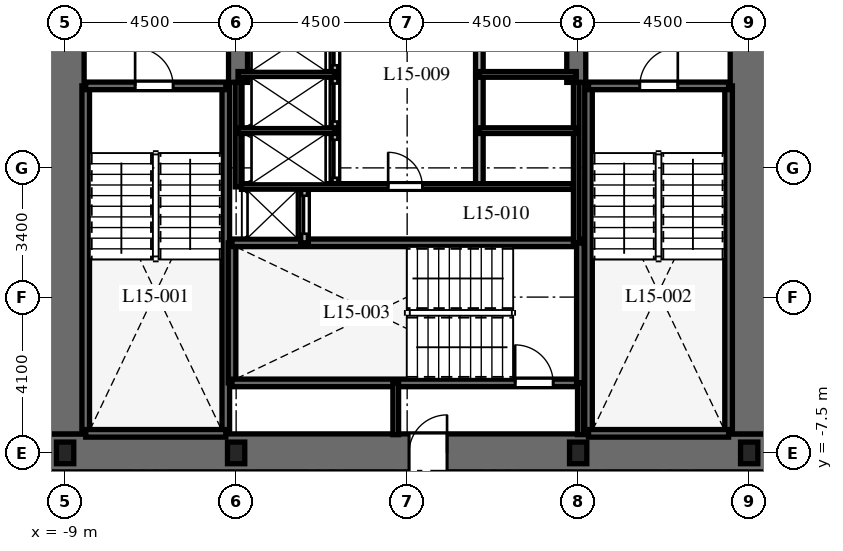
"""IFC4 building model, lengths in metres.
Left out: names, types, materials, properties, quantities, classifications, styles, units other than length and angle.
Written with IfcOpenShell. Run it as: python <this file> out.ifc"""

import sys

from ifc_helpers import new_model, si_unit, direction, frame, frame_2d, origin, origin_2d, place, context, subcontext, project, spatial, rectangle, i_section, extrude, element, fill, save


model = new_model("IFC4")
c1 = context("Model", 3, precision=1e-05, world=origin(), true_north=direction((0.0, 1.0)))
c2 = subcontext(c1, "Body", "Model", "MODEL_VIEW")
j1 = project(units=[si_unit("LENGTHUNIT", "METRE"), si_unit("PLANEANGLEUNIT", "RADIAN")], contexts=[c1])
p1 = place(None, origin())
s1 = spatial("IfcSite", under=j1, at=p1, CompositionType="ELEMENT")
p2 = place(p1, origin())
s2 = spatial("IfcBuilding", under=s1, at=p2, CompositionType="ELEMENT")
p3 = place(p2, frame((0.0, 0.0, 67.5)))
s3 = spatial("IfcBuildingStorey", under=s2, at=p3, CompositionType="ELEMENT", Elevation=67.5)
p4 = place(p3, frame((-9.5, -7.5, 0.0), z_axis=(0.0, 0.0, 1.0), x_axis=(1.0, 0.0, 0.0)))
e1 = element("IfcWall", 1, at=p4, inside=s3, PredefinedType="SHEAR", context=c2, shape_type="SweptSolid", body=[
    extrude(rectangle(XDim=19.0, YDim=1.0, at=frame_2d((9.5, 0.0))), origin(), (0.0, 0.0, 1.0), 3.7),
])
p5 = place(p4, frame((9.55, 0.0, 0.0)))
e2 = element("IfcOpeningElement", 2, at=p5, cuts=e1, PredefinedType="OPENING", context=c2, shape_type="SweptSolid", body=[
    extrude(rectangle(XDim=1.0, YDim=2.15, at=frame_2d((0.5, 1.075))), frame((0.0, 0.51, 0.0), z_axis=(0.0, -1.0, 0.0), x_axis=(1.0, 0.0, 0.0)), (0.0, 0.0, 1.0), 1.02),
])
p6 = place(p3, frame((-9.0, -7.0, 0.0), z_axis=(0.0, 0.0, 1.0), x_axis=(0.0, 1.0, 0.0)))
e3 = element("IfcWall", 3, at=p6, inside=s3, PredefinedType="SHEAR", context=c2, shape_type="SweptSolid", body=[
    extrude(rectangle(XDim=14.0, YDim=1.0, at=frame_2d((7.0, 0.0))), origin(), (0.0, 0.0, 1.0), 3.7),
])
p7 = place(p6, frame((10.125, 0.0, 0.0)))
e4 = element("IfcOpeningElement", 4, at=p7, cuts=e3, PredefinedType="OPENING", context=c2, shape_type="SweptSolid", body=[
    extrude(rectangle(XDim=1.05, YDim=2.15, at=frame_2d((0.525, 1.075))), frame((0.0, 0.51, 0.0), z_axis=(0.0, -1.0, 0.0), x_axis=(1.0, 0.0, 0.0)), (0.0, 0.0, 1.0), 1.02),
])
p8 = place(p3, frame((9.0, -7.0, 0.0), z_axis=(0.0, 0.0, 1.0), x_axis=(0.0, 1.0, 0.0)))
e5 = element("IfcWall", 5, at=p8, inside=s3, PredefinedType="SHEAR", context=c2, shape_type="SweptSolid", body=[
    extrude(rectangle(XDim=14.0, YDim=1.0, at=frame_2d((7.0, 0.0))), origin(), (0.0, 0.0, 1.0), 3.7),
])
p9 = place(p8, frame((10.125, 0.0, 0.0)))
e6 = element("IfcOpeningElement", 6, at=p9, cuts=e5, PredefinedType="OPENING", context=c2, shape_type="SweptSolid", body=[
    extrude(rectangle(XDim=1.05, YDim=2.15, at=frame_2d((0.525, 1.075))), frame((0.0, 0.51, 0.0), z_axis=(0.0, -1.0, 0.0), x_axis=(1.0, 0.0, 0.0)), (0.0, 0.0, 1.0), 1.02),
])
for number, where, z_axis, x_axis in (
    (7, (-4.45, 2.25, 0.0), (0.0, 0.0, 1.0), (0.0, 1.0, 0.0)),
    (8, (4.45, 2.25, 0.0), (0.0, 0.0, 1.0), (0.0, 1.0, 0.0)),
):
    element("IfcWall", number, at=place(p3, frame(where, z_axis=z_axis, x_axis=x_axis)), inside=s3, PredefinedType="SHEAR", context=c2, shape_type="SweptSolid", body=[
        extrude(rectangle(XDim=4.75, YDim=0.5, at=frame_2d((2.375, 0.0))), origin(), (0.0, 0.0, 1.0), 3.7),
    ])
for number, where, z_axis, x_axis in (
    (9, (-8.458, -6.985, 0.0), (0.0, 0.0, 1.0), (0.0, 1.0, 0.0)),
    (10, (-4.772, -6.985, 0.0), (0.0, 0.0, 1.0), (0.0, 1.0, 0.0)),
):
    element("IfcWall", number, at=place(p3, frame(where, z_axis=z_axis, x_axis=x_axis)), inside=s3, PredefinedType="SHEAR", context=c2, shape_type="SweptSolid", body=[
        extrude(rectangle(XDim=9.143, YDim=0.2, at=frame_2d((4.572, 0.0))), origin(), (0.0, 0.0, 1.0), 3.7),
    ])
p10 = place(p3, frame((-8.458, -6.985, 0.0), z_axis=(0.0, 0.0, 1.0), x_axis=(1.0, 0.0, 0.0)))
e11 = element("IfcWall", 11, at=p10, inside=s3, PredefinedType="SHEAR", context=c2, shape_type="SweptSolid", body=[
    extrude(rectangle(XDim=3.686, YDim=0.2, at=frame_2d((1.843, 0.0))), origin(), (0.0, 0.0, 1.0), 3.7),
])
p11 = place(p3, frame((-8.458, 2.158, 0.0), z_axis=(0.0, 0.0, 1.0), x_axis=(1.0, 0.0, 0.0)))
e12 = element("IfcWall", 12, at=p11, inside=s3, PredefinedType="SHEAR", context=c2, shape_type="SweptSolid", body=[
    extrude(rectangle(XDim=3.686, YDim=0.2, at=frame_2d((1.843, 0.0))), origin(), (0.0, 0.0, 1.0), 3.7),
])
p12 = place(p11, frame((1.3, 0.0, 0.0)))
e13 = element("IfcOpeningElement", 13, at=p12, cuts=e12, PredefinedType="OPENING", context=c2, shape_type="SweptSolid", body=[
    extrude(rectangle(XDim=1.0, YDim=2.15, at=frame_2d((0.5, 1.075))), frame((0.0, 0.11, 0.0), z_axis=(0.0, -1.0, 0.0), x_axis=(1.0, 0.0, 0.0)), (0.0, 0.0, 1.0), 0.22),
])
for number, where, z_axis, x_axis in (
    (14, (4.772, -6.985, 0.0), (0.0, 0.0, 1.0), (0.0, 1.0, 0.0)),
    (15, (8.458, -6.985, 0.0), (0.0, 0.0, 1.0), (0.0, 1.0, 0.0)),
):
    element("IfcWall", number, at=place(p3, frame(where, z_axis=z_axis, x_axis=x_axis)), inside=s3, PredefinedType="SHEAR", context=c2, shape_type="SweptSolid", body=[
        extrude(rectangle(XDim=9.143, YDim=0.2, at=frame_2d((4.572, 0.0))), origin(), (0.0, 0.0, 1.0), 3.7),
    ])
p13 = place(p3, frame((4.772, -6.985, 0.0), z_axis=(0.0, 0.0, 1.0), x_axis=(1.0, 0.0, 0.0)))
e16 = element("IfcWall", 16, at=p13, inside=s3, PredefinedType="SHEAR", context=c2, shape_type="SweptSolid", body=[
    extrude(rectangle(XDim=3.686, YDim=0.2, at=frame_2d((1.843, 0.0))), origin(), (0.0, 0.0, 1.0), 3.7),
])
p14 = place(p3, frame((4.772, 2.158, 0.0), z_axis=(0.0, 0.0, 1.0), x_axis=(1.0, 0.0, 0.0)))
e17 = element("IfcWall", 17, at=p14, inside=s3, PredefinedType="SHEAR", context=c2, shape_type="SweptSolid", body=[
    extrude(rectangle(XDim=3.686, YDim=0.2, at=frame_2d((1.843, 0.0))), origin(), (0.0, 0.0, 1.0), 3.7),
])
p15 = place(p14, frame((1.35, 0.0, 0.0)))
e18 = element("IfcOpeningElement", 18, at=p15, cuts=e17, PredefinedType="OPENING", context=c2, shape_type="SweptSolid", body=[
    extrude(rectangle(XDim=1.0, YDim=2.15, at=frame_2d((0.5, 1.075))), frame((0.0, 0.11, 0.0), z_axis=(0.0, -1.0, 0.0), x_axis=(1.0, 0.0, 0.0)), (0.0, 0.0, 1.0), 0.22),
])
p16 = place(p3, frame((-4.608, -5.658, 0.0), z_axis=(0.0, 0.0, 1.0), x_axis=(0.0, 1.0, 0.0)))
e19 = element("IfcWall", 19, at=p16, inside=s3, PredefinedType="SHEAR", context=c2, shape_type="SweptSolid", body=[
    extrude(rectangle(XDim=3.686, YDim=0.2, at=frame_2d((1.843, 0.0))), origin(), (0.0, 0.0, 1.0), 3.7),
])
p17 = place(p3, frame((-4.608, -5.658, 0.0), z_axis=(0.0, 0.0, 1.0), x_axis=(1.0, 0.0, 0.0)))
e20 = element("IfcWall", 20, at=p17, inside=s3, PredefinedType="SHEAR", context=c2, shape_type="SweptSolid", body=[
    extrude(rectangle(XDim=9.166, YDim=0.2, at=frame_2d((4.583, 0.0))), origin(), (0.0, 0.0, 1.0), 3.7),
])
p18 = place(p17, frame((7.45, 0.0, 0.0)))
e21 = element("IfcOpeningElement", 21, at=p18, cuts=e20, PredefinedType="OPENING", context=c2, shape_type="SweptSolid", body=[
    extrude(rectangle(XDim=1.0, YDim=2.15, at=frame_2d((0.5, 1.075))), frame((0.0, 0.11, 0.0), z_axis=(0.0, -1.0, 0.0), x_axis=(1.0, 0.0, 0.0)), (0.0, 0.0, 1.0), 0.22),
])
p19 = place(p3, frame((-4.608, -1.972, 0.0), z_axis=(0.0, 0.0, 1.0), x_axis=(1.0, 0.0, 0.0)))
e22 = element("IfcWall", 22, at=p19, inside=s3, PredefinedType="SHEAR", context=c2, shape_type="SweptSolid", body=[
    extrude(rectangle(XDim=9.166, YDim=0.2, at=frame_2d((4.583, 0.0))), origin(), (0.0, 0.0, 1.0), 3.7),
])
p20 = place(p3, frame((4.558, -5.658, 0.0), z_axis=(0.0, 0.0, 1.0), x_axis=(0.0, 1.0, 0.0)))
e23 = element("IfcWall", 23, at=p20, inside=s3, PredefinedType="SHEAR", context=c2, shape_type="SweptSolid", body=[
    extrude(rectangle(XDim=3.686, YDim=0.2, at=frame_2d((1.843, 0.0))), origin(), (0.0, 0.0, 1.0), 3.7),
])
for number, where, z_axis, x_axis in (
    (24, (-9.0, -7.5, 0.0), (0.0, 0.0, 1.0), (1.0, 0.0, 0.0)),
    (25, (-4.5, -7.5, 0.0), (0.0, 0.0, 1.0), (1.0, 0.0, 0.0)),
    (26, (4.5, -7.5, 0.0), (0.0, 0.0, 1.0), (1.0, 0.0, 0.0)),
    (27, (9.0, -7.5, 0.0), (0.0, 0.0, 1.0), (1.0, 0.0, 0.0)),
):
    element("IfcColumn", number, at=place(p3, frame(where, z_axis=z_axis, x_axis=x_axis)), inside=s3, PredefinedType="COLUMN", context=c2, shape_type="SweptSolid", body=[
        extrude(i_section(OverallWidth=0.454, OverallDepth=0.569, WebThickness=0.078, FlangeThickness=0.125, at=origin_2d()), origin(), (0.0, 0.0, 1.0), 3.7),
    ])
for number, where, z_axis, x_axis in (
    (28, (-0.3, -7.02, 0.0), (0.0, 0.0, 1.0), (0.0, 1.0, 0.0)),
    (29, (4.558, -7.02, 0.0), (0.0, 0.0, 1.0), (0.0, 1.0, 0.0)),
):
    element("IfcWall", number, at=place(p3, frame(where, z_axis=z_axis, x_axis=x_axis)), inside=s3, PredefinedType="PARTITIONING", context=c2, shape_type="SweptSolid", body=[
        extrude(rectangle(XDim=1.362, YDim=0.15, at=frame_2d((0.681, 0.0))), origin(), (0.0, 0.0, 1.0), 3.4),
    ])
p21 = place(p3, frame((-2.7, -1.972, 0.0), z_axis=(0.0, 0.0, 1.0), x_axis=(0.0, 1.0, 0.0)))
e30 = element("IfcWall", 30, at=p21, inside=s3, PredefinedType="PARTITIONING", context=c2, shape_type="SweptSolid", body=[
    extrude(rectangle(XDim=1.472, YDim=0.2, at=frame_2d((0.736, 0.0))), origin(), (0.0, 0.0, 1.0), 3.4),
])
p22 = place(p21, frame((0.24, 0.0, 0.0)))
e31 = element("IfcOpeningElement", 31, at=p22, cuts=e30, PredefinedType="OPENING", context=c2, shape_type="SweptSolid", body=[
    extrude(rectangle(XDim=1.0, YDim=2.2, at=frame_2d((0.5, 1.1))), frame((0.0, 0.11, 0.0), z_axis=(0.0, -1.0, 0.0), x_axis=(1.0, 0.0, 0.0)), (0.0, 0.0, 1.0), 0.22),
])
p23 = place(p3, frame((-4.45, -0.5, 0.0), z_axis=(0.0, 0.0, 1.0), x_axis=(0.0, 1.0, 0.0)))
e32 = element("IfcWall", 32, at=p23, inside=s3, PredefinedType="PARTITIONING", context=c2, shape_type="SweptSolid", body=[
    extrude(rectangle(XDim=2.75, YDim=0.15, at=frame_2d((1.375, 0.0))), origin(), (0.0, 0.0, 1.0), 3.4),
])
p24 = place(p3, frame((4.45, -1.972, 0.0), z_axis=(0.0, 0.0, 1.0), x_axis=(0.0, 1.0, 0.0)))
e33 = element("IfcWall", 33, at=p24, inside=s3, PredefinedType="PARTITIONING", context=c2, shape_type="SweptSolid", body=[
    extrude(rectangle(XDim=4.222, YDim=0.15, at=frame_2d((2.111, 0.0))), origin(), (0.0, 0.0, 1.0), 3.4),
])
p25 = place(p3, frame((-1.9, -0.5, 0.0), z_axis=(0.0, 0.0, 1.0), x_axis=(0.0, 1.0, 0.0)))
e34 = element("IfcWall", 34, at=p25, inside=s3, PredefinedType="PARTITIONING", context=c2, shape_type="SweptSolid", body=[
    extrude(rectangle(XDim=4.44, YDim=0.2, at=frame_2d((2.22, 0.0))), origin(), (0.0, 0.0, 1.0), 3.4),
])
p26 = place(p25, frame((0.24, 0.0, 0.0)))
e35 = element("IfcOpeningElement", 35, at=p26, cuts=e34, PredefinedType="OPENING", context=c2, shape_type="SweptSolid", body=[
    extrude(rectangle(XDim=1.0, YDim=2.2, at=frame_2d((0.5, 1.1))), frame((0.0, 0.11, 0.0), z_axis=(0.0, -1.0, 0.0), x_axis=(1.0, 0.0, 0.0)), (0.0, 0.0, 1.0), 0.22),
])
p27 = place(p25, frame((1.72, 0.0, 0.0)))
e36 = element("IfcOpeningElement", 36, at=p27, cuts=e34, PredefinedType="OPENING", context=c2, shape_type="SweptSolid", body=[
    extrude(rectangle(XDim=1.0, YDim=2.2, at=frame_2d((0.5, 1.1))), frame((0.0, 0.11, 0.0), z_axis=(0.0, -1.0, 0.0), x_axis=(1.0, 0.0, 0.0)), (0.0, 0.0, 1.0), 0.22),
])
p28 = place(p25, frame((3.2, 0.0, 0.0)))
e37 = element("IfcOpeningElement", 37, at=p28, cuts=e34, PredefinedType="OPENING", context=c2, shape_type="SweptSolid", body=[
    extrude(rectangle(XDim=1.0, YDim=2.2, at=frame_2d((0.5, 1.1))), frame((0.0, 0.11, 0.0), z_axis=(0.0, -1.0, 0.0), x_axis=(1.0, 0.0, 0.0)), (0.0, 0.0, 1.0), 0.22),
])
for number, where, z_axis, x_axis in (
    (38, (-4.45, 0.98, 0.0), (0.0, 0.0, 1.0), (1.0, 0.0, 0.0)),
    (39, (-4.45, 2.46, 0.0), (0.0, 0.0, 1.0), (1.0, 0.0, 0.0)),
):
    element("IfcWall", number, at=place(p3, frame(where, z_axis=z_axis, x_axis=x_axis)), inside=s3, PredefinedType="PARTITIONING", context=c2, shape_type="SweptSolid", body=[
        extrude(rectangle(XDim=2.55, YDim=0.15, at=frame_2d((1.275, 0.0))), origin(), (0.0, 0.0, 1.0), 3.4),
    ])
p29 = place(p3, frame((1.9, -0.5, 0.0), z_axis=(0.0, 0.0, 1.0), x_axis=(0.0, 1.0, 0.0)))
e40 = element("IfcWall", 40, at=p29, inside=s3, PredefinedType="PARTITIONING", context=c2, shape_type="SweptSolid", body=[
    extrude(rectangle(XDim=4.44, YDim=0.2, at=frame_2d((2.22, 0.0))), origin(), (0.0, 0.0, 1.0), 3.4),
])
for number, where, z_axis, x_axis in (
    (41, (1.9, 0.98, 0.0), (0.0, 0.0, 1.0), (1.0, 0.0, 0.0)),
    (42, (1.9, 2.46, 0.0), (0.0, 0.0, 1.0), (1.0, 0.0, 0.0)),
):
    element("IfcWall", number, at=place(p3, frame(where, z_axis=z_axis, x_axis=x_axis)), inside=s3, PredefinedType="PARTITIONING", context=c2, shape_type="SweptSolid", body=[
        extrude(rectangle(XDim=2.55, YDim=0.15, at=frame_2d((1.275, 0.0))), origin(), (0.0, 0.0, 1.0), 3.4),
    ])
p30 = place(p3, frame((-4.36, -0.49, 0.0), z_axis=(0.0, 0.0, 1.0), x_axis=(1.0, 0.0, 0.0)))
e43 = element("IfcWall", 43, at=p30, inside=s3, PredefinedType="PARTITIONING", context=c2, shape_type="SweptSolid", body=[
    extrude(rectangle(XDim=8.72, YDim=0.15, at=frame_2d((4.36, 0.0))), origin(), (0.0, 0.0, 1.0), 3.4),
])
p31 = place(p30, frame((3.86, 0.0, 0.0)))
e44 = element("IfcOpeningElement", 44, at=p31, cuts=e43, PredefinedType="OPENING", context=c2, shape_type="SweptSolid", body=[
    extrude(rectangle(XDim=0.9, YDim=2.03, at=frame_2d((0.45, 1.015))), frame((0.0, 0.085, 0.0), z_axis=(0.0, -1.0, 0.0), x_axis=(1.0, 0.0, 0.0)), (0.0, 0.0, 1.0), 0.17),
])
p32 = place(p12, origin())
e45 = element("IfcDoor", 45, at=p32, inside=s3, OperationType="SINGLE_SWING_LEFT", PredefinedType="DOOR", context=c2, shape_type="SweptSolid", body=[
    extrude(rectangle(XDim=1.0, YDim=2.15, at=frame_2d((0.5, 1.075))), frame((0.0, 0.025, 0.0), z_axis=(0.0, -1.0, 0.0), x_axis=(1.0, 0.0, 0.0)), (0.0, 0.0, 1.0), 0.05),
])
fill(e13, e45)
p33 = place(p15, origin())
e46 = element("IfcDoor", 46, at=p33, inside=s3, OperationType="SINGLE_SWING_RIGHT", PredefinedType="DOOR", context=c2, shape_type="SweptSolid", body=[
    extrude(rectangle(XDim=1.0, YDim=2.15, at=frame_2d((0.5, 1.075))), frame((0.0, 0.025, 0.0), z_axis=(0.0, -1.0, 0.0), x_axis=(1.0, 0.0, 0.0)), (0.0, 0.0, 1.0), 0.05),
])
fill(e18, e46)
p34 = place(p18, origin())
e47 = element("IfcDoor", 47, at=p34, inside=s3, OperationType="SINGLE_SWING_LEFT", PredefinedType="DOOR", context=c2, shape_type="SweptSolid", body=[
    extrude(rectangle(XDim=1.0, YDim=2.15, at=frame_2d((0.5, 1.075))), frame((0.0, 0.025, 0.0), z_axis=(0.0, -1.0, 0.0), x_axis=(1.0, 0.0, 0.0)), (0.0, 0.0, 1.0), 0.05),
])
fill(e21, e47)
p35 = place(p5, origin())
e48 = element("IfcDoor", 48, at=p35, inside=s3, OperationType="SINGLE_SWING_RIGHT", PredefinedType="DOOR", context=c2, shape_type="SweptSolid", body=[
    extrude(rectangle(XDim=1.0, YDim=2.15, at=frame_2d((0.5, 1.075))), frame((0.0, 0.025, 0.0), z_axis=(0.0, -1.0, 0.0), x_axis=(1.0, 0.0, 0.0)), (0.0, 0.0, 1.0), 0.05),
])
fill(e2, e48)
p36 = place(p22, origin())
e49 = element("IfcDoor", 49, at=p36, inside=s3, OperationType="SLIDING_TO_LEFT", PredefinedType="DOOR", context=c2, shape_type="SweptSolid", body=[
    extrude(rectangle(XDim=1.0, YDim=2.2, at=frame_2d((0.5, 1.1))), frame((0.0, 0.025, 0.0), z_axis=(0.0, -1.0, 0.0), x_axis=(1.0, 0.0, 0.0)), (0.0, 0.0, 1.0), 0.05),
])
fill(e31, e49)
p37 = place(p26, origin())
e50 = element("IfcDoor", 50, at=p37, inside=s3, OperationType="SLIDING_TO_LEFT", PredefinedType="DOOR", context=c2, shape_type="SweptSolid", body=[
    extrude(rectangle(XDim=1.0, YDim=2.2, at=frame_2d((0.5, 1.1))), frame((0.0, 0.025, 0.0), z_axis=(0.0, -1.0, 0.0), x_axis=(1.0, 0.0, 0.0)), (0.0, 0.0, 1.0), 0.05),
])
fill(e35, e50)
p38 = place(p27, origin())
e51 = element("IfcDoor", 51, at=p38, inside=s3, OperationType="SLIDING_TO_LEFT", PredefinedType="DOOR", context=c2, shape_type="SweptSolid", body=[
    extrude(rectangle(XDim=1.0, YDim=2.2, at=frame_2d((0.5, 1.1))), frame((0.0, 0.025, 0.0), z_axis=(0.0, -1.0, 0.0), x_axis=(1.0, 0.0, 0.0)), (0.0, 0.0, 1.0), 0.05),
])
fill(e36, e51)
p39 = place(p28, origin())
e52 = element("IfcDoor", 52, at=p39, inside=s3, OperationType="SLIDING_TO_LEFT", PredefinedType="DOOR", context=c2, shape_type="SweptSolid", body=[
    extrude(rectangle(XDim=1.0, YDim=2.2, at=frame_2d((0.5, 1.1))), frame((0.0, 0.025, 0.0), z_axis=(0.0, -1.0, 0.0), x_axis=(1.0, 0.0, 0.0)), (0.0, 0.0, 1.0), 0.05),
])
fill(e37, e52)
p40 = place(p31, origin())
e53 = element("IfcDoor", 53, at=p40, inside=s3, OperationType="SINGLE_SWING_LEFT", PredefinedType="DOOR", context=c2, shape_type="SweptSolid", body=[
    extrude(rectangle(XDim=0.9, YDim=2.03, at=frame_2d((0.45, 1.015))), frame((0.0, 0.025, 0.0), z_axis=(0.0, -1.0, 0.0), x_axis=(1.0, 0.0, 0.0)), (0.0, 0.0, 1.0), 0.05),
])
fill(e44, e53)
save(model, sys.argv[1])
